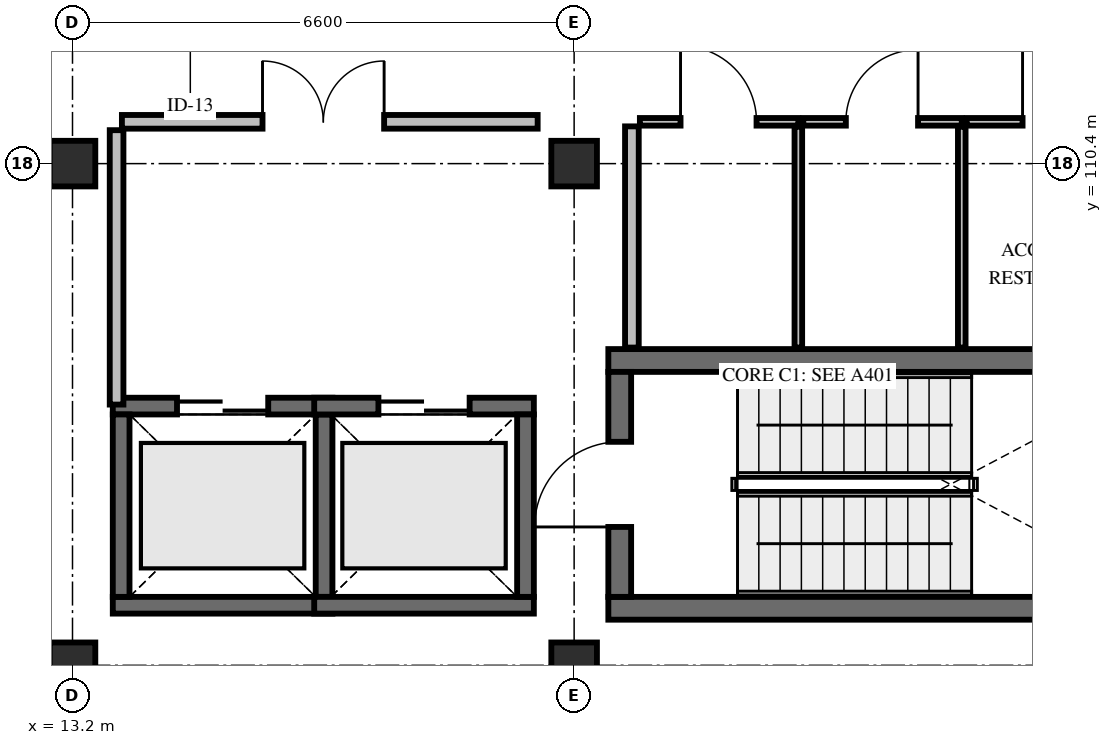
"""IFC4 building model, lengths in metres.
Left out: names, types, materials, properties, quantities, classifications, styles, units other than length and angle.
Written with IfcOpenShell. Run it as: python <this file> out.ifc"""

import sys

from ifc_helpers import new_model, si_unit, direction, frame, frame_2d, origin, origin_2d, place, context, subcontext, project, spatial, rectangle, extrude, element, fill, save


model = new_model("IFC4")
c1 = context("Model", 3, precision=1e-05, world=origin(), true_north=direction((0.0, 1.0)))
c2 = subcontext(c1, "Body", "Model", "MODEL_VIEW")
j1 = project(units=[si_unit("LENGTHUNIT", "METRE"), si_unit("PLANEANGLEUNIT", "RADIAN")], contexts=[c1])
p1 = place(None, origin())
s1 = spatial("IfcSite", under=j1, at=p1, CompositionType="ELEMENT")
p2 = place(p1, origin())
s2 = spatial("IfcBuilding", under=s1, at=p2, CompositionType="ELEMENT")
p3 = place(p2, frame((0.0, 0.0, 42.6)))
s3 = spatial("IfcBuildingStorey", under=s2, at=p3, CompositionType="ELEMENT", Elevation=42.6)
for number, where, z_axis, x_axis in (
    (1, (13.2, 103.8, 0.0), (0.0, 0.0, 1.0), (1.0, 0.0, 0.0)),
    (2, (13.2, 110.4, 0.0), (0.0, 0.0, 1.0), (1.0, 0.0, 0.0)),
    (3, (19.8, 103.8, 0.0), (0.0, 0.0, 1.0), (1.0, 0.0, 0.0)),
    (4, (19.8, 110.4, 0.0), (0.0, 0.0, 1.0), (1.0, 0.0, 0.0)),
):
    element("IfcColumn", number, at=place(p3, frame(where, z_axis=z_axis, x_axis=x_axis)), inside=s3, PredefinedType="COLUMN", context=c2, shape_type="SweptSolid", body=[
        extrude(rectangle(XDim=0.6, YDim=0.6, at=origin_2d()), origin(), (0.0, 0.0, 1.0), 4.2),
    ])
for number, where, z_axis, x_axis in (
    (5, (20.25, 104.55, 0.0), (0.0, 0.0, 1.0), (1.0, 0.0, 0.0)),
    (6, (20.25, 107.81, 0.0), (0.0, 0.0, 1.0), (1.0, 0.0, 0.0)),
):
    element("IfcWall", number, at=place(p3, frame(where, z_axis=z_axis, x_axis=x_axis)), inside=s3, PredefinedType="SHEAR", context=c2, shape_type="SweptSolid", body=[
        extrude(rectangle(XDim=7.6, YDim=0.3, at=frame_2d((3.8, 0.0))), origin(), (0.0, 0.0, 1.0), 3.9),
    ])
p4 = place(p3, frame((20.4, 104.7, 0.0), z_axis=(0.0, 0.0, 1.0), x_axis=(0.0, 1.0, 0.0)))
e7 = element("IfcWall", 7, at=p4, inside=s3, PredefinedType="SHEAR", context=c2, shape_type="SweptSolid", body=[
    extrude(rectangle(XDim=2.96, YDim=0.3, at=frame_2d((1.48, 0.0))), origin(), (0.0, 0.0, 1.0), 3.9),
])
p5 = place(p4, frame((0.92, 0.0, 0.0)))
e8 = element("IfcOpeningElement", 8, at=p5, cuts=e7, PredefinedType="OPENING", context=c2, shape_type="SweptSolid", body=[
    extrude(rectangle(XDim=1.12, YDim=2.2, at=frame_2d((0.56, 1.1))), frame((0.0, 0.165, 0.0), z_axis=(0.0, -1.0, 0.0), x_axis=(1.0, 0.0, 0.0)), (0.0, 0.0, 1.0), 0.33),
])
p6 = place(p3, frame((13.73, 104.59, 0.0), z_axis=(0.0, 0.0, 1.0), x_axis=(1.0, 0.0, 0.0)))
e9 = element("IfcWall", 9, at=p6, inside=s3, PredefinedType="SHEAR", context=c2, shape_type="SweptSolid", body=[
    extrude(rectangle(XDim=2.89, YDim=0.22, at=frame_2d((1.445, 0.0))), origin(), (0.0, 0.0, 1.0), 3.9),
])
p7 = place(p3, frame((13.73, 107.21, 0.0), z_axis=(0.0, 0.0, 1.0), x_axis=(1.0, 0.0, 0.0)))
e10 = element("IfcWall", 10, at=p7, inside=s3, PredefinedType="SHEAR", context=c2, shape_type="SweptSolid", body=[
    extrude(rectangle(XDim=2.89, YDim=0.22, at=frame_2d((1.445, 0.0))), origin(), (0.0, 0.0, 1.0), 3.9),
])
p8 = place(p7, frame((0.845, 0.0, 0.0)))
e11 = element("IfcOpeningElement", 11, at=p8, cuts=e10, PredefinedType="OPENING", context=c2, shape_type="SweptSolid", body=[
    extrude(rectangle(XDim=1.2, YDim=2.2, at=frame_2d((0.6, 1.1))), frame((0.0, 0.125, 0.0), z_axis=(0.0, -1.0, 0.0), x_axis=(1.0, 0.0, 0.0)), (0.0, 0.0, 1.0), 0.25),
])
for number, where, z_axis, x_axis in (
    (12, (13.84, 104.7, 0.0), (0.0, 0.0, 1.0), (0.0, 1.0, 0.0)),
    (13, (16.51, 104.7, 0.0), (0.0, 0.0, 1.0), (0.0, 1.0, 0.0)),
):
    element("IfcWall", number, at=place(p3, frame(where, z_axis=z_axis, x_axis=x_axis)), inside=s3, PredefinedType="SHEAR", context=c2, shape_type="SweptSolid", body=[
        extrude(rectangle(XDim=2.4, YDim=0.22, at=frame_2d((1.2, 0.0))), origin(), (0.0, 0.0, 1.0), 3.9),
    ])
p9 = place(p3, frame((16.38, 104.59, 0.0), z_axis=(0.0, 0.0, 1.0), x_axis=(1.0, 0.0, 0.0)))
e14 = element("IfcWall", 14, at=p9, inside=s3, PredefinedType="SHEAR", context=c2, shape_type="SweptSolid", body=[
    extrude(rectangle(XDim=2.89, YDim=0.22, at=frame_2d((1.445, 0.0))), origin(), (0.0, 0.0, 1.0), 3.9),
])
p10 = place(p3, frame((16.38, 107.21, 0.0), z_axis=(0.0, 0.0, 1.0), x_axis=(1.0, 0.0, 0.0)))
e15 = element("IfcWall", 15, at=p10, inside=s3, PredefinedType="SHEAR", context=c2, shape_type="SweptSolid", body=[
    extrude(rectangle(XDim=2.89, YDim=0.22, at=frame_2d((1.445, 0.0))), origin(), (0.0, 0.0, 1.0), 3.9),
])
p11 = place(p10, frame((0.845, 0.0, 0.0)))
e16 = element("IfcOpeningElement", 16, at=p11, cuts=e15, PredefinedType="OPENING", context=c2, shape_type="SweptSolid", body=[
    extrude(rectangle(XDim=1.2, YDim=2.2, at=frame_2d((0.6, 1.1))), frame((0.0, 0.125, 0.0), z_axis=(0.0, -1.0, 0.0), x_axis=(1.0, 0.0, 0.0)), (0.0, 0.0, 1.0), 0.25),
])
p12 = place(p3, frame((19.16, 104.7, 0.0), z_axis=(0.0, 0.0, 1.0), x_axis=(0.0, 1.0, 0.0)))
e17 = element("IfcWall", 17, at=p12, inside=s3, PredefinedType="SHEAR", context=c2, shape_type="SweptSolid", body=[
    extrude(rectangle(XDim=2.4, YDim=0.22, at=frame_2d((1.2, 0.0))), origin(), (0.0, 0.0, 1.0), 3.9),
])
p13 = place(p3, frame((13.85, 110.95, 0.0), z_axis=(0.0, 0.0, 1.0), x_axis=(1.0, 0.0, 0.0)))
e18 = element("IfcWall", 18, at=p13, inside=s3, PredefinedType="PARTITIONING", context=c2, shape_type="SweptSolid", body=[
    extrude(rectangle(XDim=5.47, YDim=0.18, at=frame_2d((2.735, 0.0))), origin(), (0.0, 0.0, 1.0), 3.745),
])
p14 = place(p13, frame((1.85, 0.0, 0.0)))
e19 = element("IfcOpeningElement", 19, at=p14, cuts=e18, PredefinedType="OPENING", context=c2, shape_type="SweptSolid", body=[
    extrude(rectangle(XDim=1.6, YDim=2.25, at=frame_2d((0.8, 1.125))), frame((0.0, 0.105, 0.0), z_axis=(0.0, -1.0, 0.0), x_axis=(1.0, 0.0, 0.0)), (0.0, 0.0, 1.0), 0.21),
])
p15 = place(p3, frame((13.78, 107.23, 0.0), z_axis=(0.0, 0.0, 1.0), x_axis=(0.0, 1.0, 0.0)))
e20 = element("IfcWall", 20, at=p15, inside=s3, PredefinedType="PARTITIONING", context=c2, shape_type="SweptSolid", body=[
    extrude(rectangle(XDim=3.61, YDim=0.18, at=frame_2d((1.805, 0.0))), origin(), (0.0, 0.0, 1.0), 3.58),
])
p16 = place(p3, frame((20.56, 107.98, 0.0), z_axis=(0.0, 0.0, 1.0), x_axis=(0.0, 1.0, 0.0)))
e21 = element("IfcWall", 21, at=p16, inside=s3, PredefinedType="PARTITIONING", context=c2, shape_type="SweptSolid", body=[
    extrude(rectangle(XDim=2.91, YDim=0.18, at=frame_2d((1.455, 0.0))), origin(), (0.0, 0.0, 1.0), 3.23),
])
p17 = place(p3, frame((20.665, 110.95, 0.0), z_axis=(0.0, 0.0, 1.0), x_axis=(1.0, 0.0, 0.0)))
e22 = element("IfcWall", 22, at=p17, inside=s3, PredefinedType="PARTITIONING", context=c2, shape_type="SweptSolid", body=[
    extrude(rectangle(XDim=2.085, YDim=0.1, at=frame_2d((1.042, 0.0))), origin(), (0.0, 0.0, 1.0), 3.745),
])
p18 = place(p17, frame((0.535, 0.0, 0.0)))
e23 = element("IfcOpeningElement", 23, at=p18, cuts=e22, PredefinedType="OPENING", context=c2, shape_type="SweptSolid", body=[
    extrude(rectangle(XDim=1.0, YDim=2.15, at=frame_2d((0.5, 1.075))), frame((0.0, 0.065, 0.0), z_axis=(0.0, -1.0, 0.0), x_axis=(1.0, 0.0, 0.0)), (0.0, 0.0, 1.0), 0.13),
])
p19 = place(p3, frame((22.75, 107.98, 0.0), z_axis=(0.0, 0.0, 1.0), x_axis=(0.0, 1.0, 0.0)))
e24 = element("IfcWall", 24, at=p19, inside=s3, PredefinedType="PARTITIONING", context=c2, shape_type="SweptSolid", body=[
    extrude(rectangle(XDim=2.905, YDim=0.1, at=frame_2d((1.453, 0.0))), origin(), (0.0, 0.0, 1.0), 3.23),
])
p20 = place(p3, frame((22.815, 110.95, 0.0), z_axis=(0.0, 0.0, 1.0), x_axis=(1.0, 0.0, 0.0)))
e25 = element("IfcWall", 25, at=p20, inside=s3, PredefinedType="PARTITIONING", context=c2, shape_type="SweptSolid", body=[
    extrude(rectangle(XDim=2.085, YDim=0.1, at=frame_2d((1.042, 0.0))), origin(), (0.0, 0.0, 1.0), 3.88),
])
p21 = place(p20, frame((0.56, 0.0, 0.0)))
e26 = element("IfcOpeningElement", 26, at=p21, cuts=e25, PredefinedType="OPENING", context=c2, shape_type="SweptSolid", body=[
    extrude(rectangle(XDim=0.95, YDim=2.15, at=frame_2d((0.475, 1.075))), frame((0.0, 0.065, 0.0), z_axis=(0.0, -1.0, 0.0), x_axis=(1.0, 0.0, 0.0)), (0.0, 0.0, 1.0), 0.13),
])
p22 = place(p3, frame((24.9, 107.98, 0.0), z_axis=(0.0, 0.0, 1.0), x_axis=(0.0, 1.0, 0.0)))
e27 = element("IfcWall", 27, at=p22, inside=s3, PredefinedType="PARTITIONING", context=c2, shape_type="SweptSolid", body=[
    extrude(rectangle(XDim=2.905, YDim=0.1, at=frame_2d((1.453, 0.0))), origin(), (0.0, 0.0, 1.0), 3.23),
])
p23 = place(p3, frame((24.965, 110.95, 0.0), z_axis=(0.0, 0.0, 1.0), x_axis=(1.0, 0.0, 0.0)))
e28 = element("IfcWall", 28, at=p23, inside=s3, PredefinedType="PARTITIONING", context=c2, shape_type="SweptSolid", body=[
    extrude(rectangle(XDim=2.485, YDim=0.1, at=frame_2d((1.242, 0.0))), origin(), (0.0, 0.0, 1.0), 3.745),
])
p24 = place(p23, frame((0.735, 0.0, 0.0)))
e29 = element("IfcOpeningElement", 29, at=p24, cuts=e28, PredefinedType="OPENING", context=c2, shape_type="SweptSolid", body=[
    extrude(rectangle(XDim=1.0, YDim=2.15, at=frame_2d((0.5, 1.075))), frame((0.0, 0.065, 0.0), z_axis=(0.0, -1.0, 0.0), x_axis=(1.0, 0.0, 0.0)), (0.0, 0.0, 1.0), 0.13),
])
p25 = place(p5, origin())
e30 = element("IfcDoor", 30, at=p25, inside=s3, OperationType="SINGLE_SWING_LEFT", PredefinedType="DOOR", context=c2, shape_type="SweptSolid", body=[
    extrude(rectangle(XDim=1.12, YDim=2.2, at=frame_2d((0.56, 1.1))), frame((0.0, 0.025, 0.0), z_axis=(0.0, -1.0, 0.0), x_axis=(1.0, 0.0, 0.0)), (0.0, 0.0, 1.0), 0.05),
])
fill(e8, e30)
p26 = place(p8, origin())
e31 = element("IfcDoor", 31, at=p26, inside=s3, OperationType="DOUBLE_DOOR_SLIDING", PredefinedType="DOOR", context=c2, shape_type="SweptSolid", body=[
    extrude(rectangle(XDim=1.2, YDim=2.2, at=frame_2d((0.6, 1.1))), frame((0.0, 0.025, 0.0), z_axis=(0.0, -1.0, 0.0), x_axis=(1.0, 0.0, 0.0)), (0.0, 0.0, 1.0), 0.05),
])
fill(e11, e31)
p27 = place(p11, origin())
e32 = element("IfcDoor", 32, at=p27, inside=s3, OperationType="DOUBLE_DOOR_SLIDING", PredefinedType="DOOR", context=c2, shape_type="SweptSolid", body=[
    extrude(rectangle(XDim=1.2, YDim=2.2, at=frame_2d((0.6, 1.1))), frame((0.0, 0.025, 0.0), z_axis=(0.0, -1.0, 0.0), x_axis=(1.0, 0.0, 0.0)), (0.0, 0.0, 1.0), 0.05),
])
fill(e16, e32)
p28 = place(p14, origin())
e33 = element("IfcDoor", 33, at=p28, inside=s3, OperationType="DOUBLE_DOOR_SINGLE_SWING", PredefinedType="DOOR", context=c2, shape_type="SweptSolid", body=[
    extrude(rectangle(XDim=1.6, YDim=2.25, at=frame_2d((0.8, 1.125))), frame((0.0, 0.025, 0.0), z_axis=(0.0, -1.0, 0.0), x_axis=(1.0, 0.0, 0.0)), (0.0, 0.0, 1.0), 0.05),
])
fill(e19, e33)
p29 = place(p18, origin())
e34 = element("IfcDoor", 34, at=p29, inside=s3, OperationType="SINGLE_SWING_LEFT", PredefinedType="DOOR", context=c2, shape_type="SweptSolid", body=[
    extrude(rectangle(XDim=1.0, YDim=2.15, at=frame_2d((0.5, 1.075))), frame((0.0, 0.025, 0.0), z_axis=(0.0, -1.0, 0.0), x_axis=(1.0, 0.0, 0.0)), (0.0, 0.0, 1.0), 0.05),
])
fill(e23, e34)
p30 = place(p21, origin())
e35 = element("IfcDoor", 35, at=p30, inside=s3, OperationType="SINGLE_SWING_RIGHT", PredefinedType="DOOR", context=c2, shape_type="SweptSolid", body=[
    extrude(rectangle(XDim=0.95, YDim=2.15, at=frame_2d((0.475, 1.075))), frame((0.0, 0.025, 0.0), z_axis=(0.0, -1.0, 0.0), x_axis=(1.0, 0.0, 0.0)), (0.0, 0.0, 1.0), 0.05),
])
fill(e26, e35)
p31 = place(p24, origin())
e36 = element("IfcDoor", 36, at=p31, inside=s3, OperationType="SINGLE_SWING_LEFT", PredefinedType="DOOR", context=c2, shape_type="SweptSolid", body=[
    extrude(rectangle(XDim=1.0, YDim=2.15, at=frame_2d((0.5, 1.075))), frame((0.0, 0.025, 0.0), z_axis=(0.0, -1.0, 0.0), x_axis=(1.0, 0.0, 0.0)), (0.0, 0.0, 1.0), 0.05),
])
fill(e29, e36)
save(model, sys.argv[1])
